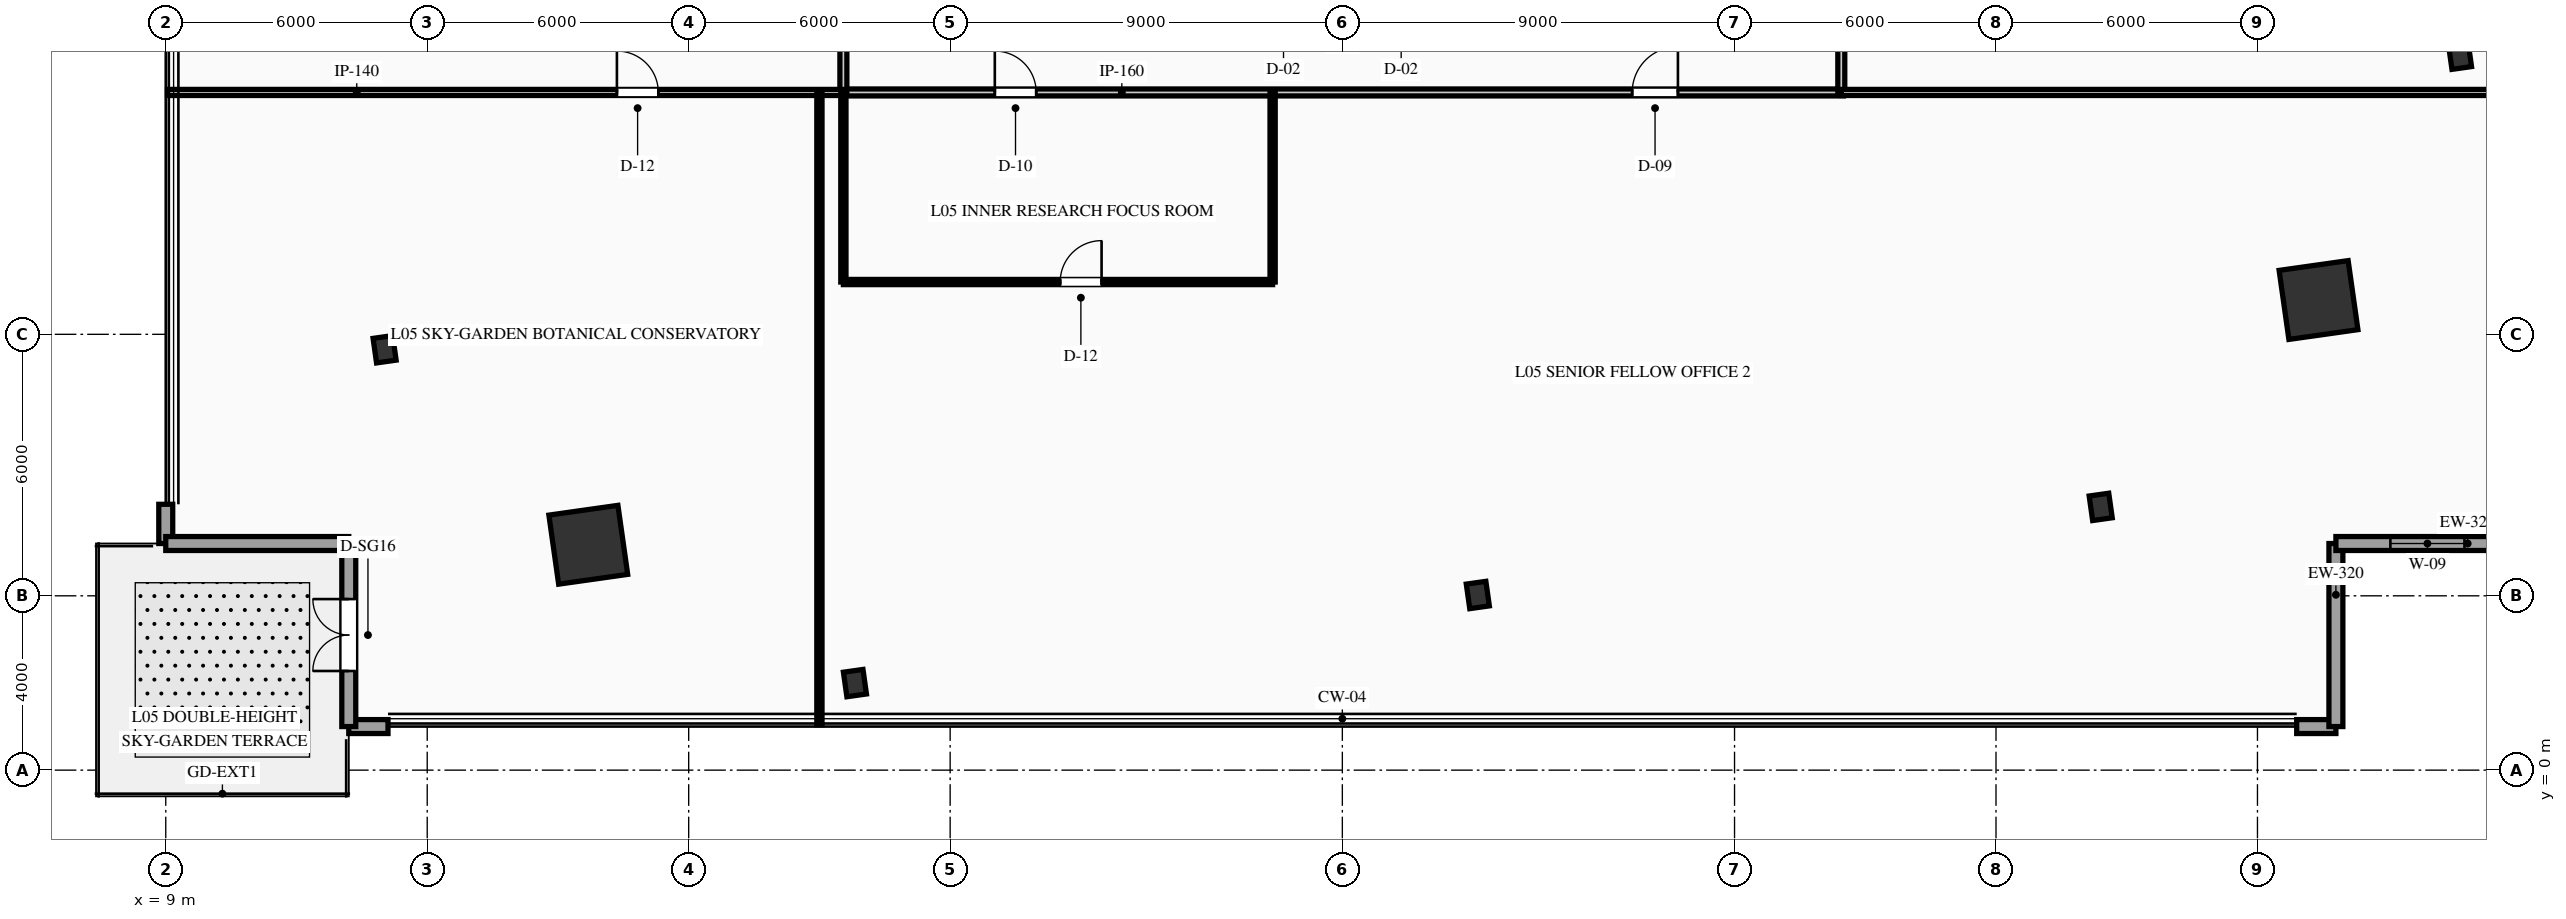
"""IFC4 building model, lengths in metres.
Left out: names, types, materials, properties, quantities, classifications, styles, units other than length and angle.
Written with IfcOpenShell. Run it as: python <this file> out.ifc"""

import sys

from ifc_helpers import new_model, si_unit, direction, frame, frame_2d, origin, origin_2d, place, context, subcontext, project, spatial, rectangle, hollow_rectangle, i_section, extrude, element, fill, save


model = new_model("IFC4")
c1 = context("Model", 3, precision=1e-05, world=origin(), true_north=direction((0.0, 1.0)))
c2 = subcontext(c1, "Body", "Model", "MODEL_VIEW")
j1 = project(units=[si_unit("LENGTHUNIT", "METRE"), si_unit("PLANEANGLEUNIT", "RADIAN")], contexts=[c1])
p1 = place(None, origin())
s1 = spatial("IfcSite", under=j1, at=p1, CompositionType="ELEMENT")
p2 = place(p1, origin())
s2 = spatial("IfcBuilding", under=s1, at=p2, CompositionType="ELEMENT")
p3 = place(p2, frame((0.0, 0.0, 28.2)))
s3 = spatial("IfcBuildingStorey", under=s2, at=p3, CompositionType="ELEMENT", Elevation=28.2)
for number, where, z_axis, x_axis in (
    (1, (18.696, 5.172, 0.0), (0.0, 0.0, 1.0), (0.99, 0.14, 0.0)),
    (2, (58.401, 10.787, 0.0), (0.0, 0.0, 1.0), (0.99, 0.14, 0.0)),
):
    element("IfcColumn", number, at=place(p3, frame(where, z_axis=z_axis, x_axis=x_axis)), inside=s3, PredefinedType="COLUMN", context=c2, shape_type="SweptSolid", body=[
        extrude(hollow_rectangle(XDim=1.6, YDim=1.6, WallThickness=0.08, at=origin_2d()), origin(), (0.0, 0.0, 1.0), 4.5),
    ])
for number, where, z_axis, x_axis in (
    (3, (24.815, 1.997, 0.0), (0.0, 0.0, 1.0), (0.99, 0.14, 0.0)),
    (4, (39.109, 4.019, 0.0), (0.0, 0.0, 1.0), (0.99, 0.14, 0.0)),
    (5, (53.403, 6.04, 0.0), (0.0, 0.0, 1.0), (0.99, 0.14, 0.0)),
    (6, (61.648, 16.393, 0.0), (0.0, 0.0, 1.0), (0.99, 0.14, 0.0)),
    (7, (14.022, 9.657, 0.0), (0.0, 0.0, 1.0), (0.99, 0.14, 0.0)),
):
    element("IfcColumn", number, at=place(p3, frame(where, z_axis=z_axis, x_axis=x_axis)), inside=s3, PredefinedType="COLUMN", context=c2, shape_type="SweptSolid", body=[
        extrude(i_section(OverallWidth=0.454, OverallDepth=0.569, WebThickness=0.078, FlangeThickness=0.125, at=origin_2d()), origin(), (0.0, 0.0, 1.0), 4.5),
    ])
for number, where, z_axis, x_axis in (
    (8, (58.8, 1.0, 0.0), (0.0, 0.0, 1.0), (-1.0, 0.0, 0.0)),
    (9, (14.1, 1.0, 0.0), (0.0, 0.0, 1.0), (-1.0, 0.0, 0.0)),
):
    element("IfcWall", number, at=place(p3, frame(where, z_axis=z_axis, x_axis=x_axis)), inside=s3, PredefinedType="STANDARD", context=c2, shape_type="SweptSolid", body=[
        extrude(rectangle(XDim=0.9, YDim=0.32, at=frame_2d((0.45, 0.0))), origin(), (0.0, 0.0, 1.0), 4.19),
    ])
p4 = place(p3, frame((58.8, 5.2, 0.0), z_axis=(0.0, 0.0, 1.0), x_axis=(0.0, -1.0, 0.0)))
e10 = element("IfcWall", 10, at=p4, inside=s3, PredefinedType="STANDARD", context=c2, shape_type="SweptSolid", body=[
    extrude(rectangle(XDim=4.2, YDim=0.32, at=frame_2d((2.1, 0.0))), origin(), (0.0, 0.0, 1.0), 4.19),
])
p5 = place(p3, frame((63.0, 5.2, 0.0), z_axis=(0.0, 0.0, 1.0), x_axis=(-1.0, 0.0, 0.0)))
e11 = element("IfcWall", 11, at=p5, inside=s3, PredefinedType="STANDARD", context=c2, shape_type="SweptSolid", body=[
    extrude(rectangle(XDim=4.2, YDim=0.32, at=frame_2d((2.1, 0.0))), origin(), (0.0, 0.0, 1.0), 4.19),
])
p6 = place(p5, frame((1.25, 0.0, 0.75)))
e12 = element("IfcOpeningElement", 12, at=p6, cuts=e11, PredefinedType="OPENING", context=c2, shape_type="SweptSolid", body=[
    extrude(rectangle(XDim=1.7, YDim=2.5, at=frame_2d((0.85, 1.25))), frame((0.0, 0.17, 0.0), z_axis=(0.0, -1.0, 0.0), x_axis=(1.0, 0.0, 0.0)), (0.0, 0.0, 1.0), 0.34),
])
p7 = place(p3, frame((9.0, 5.2, 0.0), z_axis=(0.0, 0.0, 1.0), x_axis=(0.0, 1.0, 0.0)))
e13 = element("IfcWall", 13, at=p7, inside=s3, PredefinedType="STANDARD", context=c2, shape_type="SweptSolid", body=[
    extrude(rectangle(XDim=0.9, YDim=0.32, at=frame_2d((0.45, 0.0))), origin(), (0.0, 0.0, 1.0), 4.19),
])
p8 = place(p3, frame((13.2, 5.2, 0.0), z_axis=(0.0, 0.0, 1.0), x_axis=(-1.0, 0.0, 0.0)))
e14 = element("IfcWall", 14, at=p8, inside=s3, PredefinedType="STANDARD", context=c2, shape_type="SweptSolid", body=[
    extrude(rectangle(XDim=4.2, YDim=0.32, at=frame_2d((2.1, 0.0))), origin(), (0.0, 0.0, 1.0), 4.19),
])
p9 = place(p3, frame((13.2, 1.0, 0.0), z_axis=(0.0, 0.0, 1.0), x_axis=(0.0, 1.0, 0.0)))
e15 = element("IfcWall", 15, at=p9, inside=s3, PredefinedType="STANDARD", context=c2, shape_type="SweptSolid", body=[
    extrude(rectangle(XDim=4.2, YDim=0.32, at=frame_2d((2.1, 0.0))), origin(), (0.0, 0.0, 1.0), 4.19),
])
p10 = place(p9, frame((1.275, 0.0, 0.0)))
e16 = element("IfcOpeningElement", 16, at=p10, cuts=e15, PredefinedType="OPENING", context=c2, shape_type="SweptSolid", body=[
    extrude(rectangle(XDim=1.65, YDim=2.35, at=frame_2d((0.825, 1.175))), frame((0.0, 0.17, 0.0), z_axis=(0.0, -1.0, 0.0), x_axis=(1.0, 0.0, 0.0)), (0.0, 0.0, 1.0), 0.34),
])
p11 = place(p3, frame((24.5, 15.55, 0.0), z_axis=(0.0, 0.0, 1.0), x_axis=(1.0, 0.0, 0.0)))
e17 = element("IfcWall", 17, at=p11, inside=s3, PredefinedType="PARTITIONING", context=c2, shape_type="SweptSolid", body=[
    extrude(rectangle(XDim=23.0, YDim=0.16, at=frame_2d((11.5, 0.0))), origin(), (0.0, 0.0, 1.0), 4.19),
])
p12 = place(p11, frame((3.525, 0.0, 0.0)))
e18 = element("IfcOpeningElement", 18, at=p12, cuts=e17, PredefinedType="OPENING", context=c2, shape_type="SweptSolid", body=[
    extrude(rectangle(XDim=0.95, YDim=2.15, at=frame_2d((0.475, 1.075))), frame((0.0, 0.09, 0.0), z_axis=(0.0, -1.0, 0.0), x_axis=(1.0, 0.0, 0.0)), (0.0, 0.0, 1.0), 0.18),
])
p13 = place(p11, frame((18.151, 0.0, 0.0)))
e19 = element("IfcOpeningElement", 19, at=p13, cuts=e17, PredefinedType="OPENING", context=c2, shape_type="SweptSolid", body=[
    extrude(rectangle(XDim=1.05, YDim=2.15, at=frame_2d((0.525, 1.075))), frame((0.0, 0.09, 0.0), z_axis=(0.0, -1.0, 0.0), x_axis=(1.0, 0.0, 0.0)), (0.0, 0.0, 1.0), 0.18),
])
p14 = place(p3, frame((24.55, 15.55, 0.0), z_axis=(0.0, 0.0, 1.0), x_axis=(0.0, 1.0, 0.0)))
e20 = element("IfcWall", 20, at=p14, inside=s3, PredefinedType="PARTITIONING", context=c2, shape_type="SweptSolid", body=[
    extrude(rectangle(XDim=20.9, YDim=0.16, at=frame_2d((10.45, 0.0))), origin(), (0.0, 0.0, 1.0), 4.19),
])
p15 = place(p14, frame((2.052, 0.0, 0.0)))
e21 = element("IfcOpeningElement", 21, at=p15, cuts=e20, PredefinedType="OPENING", context=c2, shape_type="SweptSolid", body=[
    extrude(rectangle(XDim=1.05, YDim=2.15, at=frame_2d((0.525, 1.075))), frame((0.0, 0.09, 0.0), z_axis=(0.0, -1.0, 0.0), x_axis=(1.0, 0.0, 0.0)), (0.0, 0.0, 1.0), 0.18),
])
p16 = place(p14, frame((15.645, 0.0, 0.0)))
e22 = element("IfcOpeningElement", 22, at=p16, cuts=e20, PredefinedType="OPENING", context=c2, shape_type="SweptSolid", body=[
    extrude(rectangle(XDim=1.05, YDim=2.15, at=frame_2d((0.525, 1.075))), frame((0.0, 0.09, 0.0), z_axis=(0.0, -1.0, 0.0), x_axis=(1.0, 0.0, 0.0)), (0.0, 0.0, 1.0), 0.18),
])
p17 = place(p3, frame((47.45, 15.55, 0.0), z_axis=(0.0, 0.0, 1.0), x_axis=(0.0, 1.0, 0.0)))
e23 = element("IfcWall", 23, at=p17, inside=s3, PredefinedType="PARTITIONING", context=c2, shape_type="SweptSolid", body=[
    extrude(rectangle(XDim=20.9, YDim=0.16, at=frame_2d((10.45, 0.0))), origin(), (0.0, 0.0, 1.0), 4.19),
])
p18 = place(p17, frame((3.747, 0.0, 0.0)))
e24 = element("IfcOpeningElement", 24, at=p18, cuts=e23, PredefinedType="OPENING", context=c2, shape_type="SweptSolid", body=[
    extrude(rectangle(XDim=1.05, YDim=2.15, at=frame_2d((0.525, 1.075))), frame((0.0, 0.09, 0.0), z_axis=(0.0, -1.0, 0.0), x_axis=(1.0, 0.0, 0.0)), (0.0, 0.0, 1.0), 0.18),
])
p19 = place(p17, frame((7.865, 0.0, 0.0)))
e25 = element("IfcOpeningElement", 25, at=p19, cuts=e23, PredefinedType="OPENING", context=c2, shape_type="SweptSolid", body=[
    extrude(rectangle(XDim=1.05, YDim=2.15, at=frame_2d((0.525, 1.075))), frame((0.0, 0.09, 0.0), z_axis=(0.0, -1.0, 0.0), x_axis=(1.0, 0.0, 0.0)), (0.0, 0.0, 1.0), 0.18),
])
p20 = place(p17, frame((18.045, 0.0, 0.0)))
e26 = element("IfcOpeningElement", 26, at=p20, cuts=e23, PredefinedType="OPENING", context=c2, shape_type="SweptSolid", body=[
    extrude(rectangle(XDim=1.05, YDim=2.15, at=frame_2d((0.525, 1.075))), frame((0.0, 0.09, 0.0), z_axis=(0.0, -1.0, 0.0), x_axis=(1.0, 0.0, 0.0)), (0.0, 0.0, 1.0), 0.18),
])
p21 = place(p3, frame((9.04, 15.55, 0.0), z_axis=(0.0, 0.0, 1.0), x_axis=(1.0, 0.0, 0.0)))
e27 = element("IfcWall", 27, at=p21, inside=s3, PredefinedType="PARTITIONING", context=c2, shape_type="SweptSolid", body=[
    extrude(rectangle(XDim=15.51, YDim=0.14, at=frame_2d((7.755, 0.0))), origin(), (0.0, 0.0, 1.0), 4.19),
])
p22 = place(p21, frame((10.313, 0.0, 0.0)))
e28 = element("IfcOpeningElement", 28, at=p22, cuts=e27, PredefinedType="OPENING", context=c2, shape_type="SweptSolid", body=[
    extrude(rectangle(XDim=0.95, YDim=2.15, at=frame_2d((0.475, 1.075))), frame((0.0, 0.08, 0.0), z_axis=(0.0, -1.0, 0.0), x_axis=(1.0, 0.0, 0.0)), (0.0, 0.0, 1.0), 0.16),
])
p23 = place(p3, frame((47.45, 15.55, 0.0), z_axis=(0.0, 0.0, 1.0), x_axis=(1.0, 0.0, 0.0)))
e29 = element("IfcWall", 29, at=p23, inside=s3, PredefinedType="PARTITIONING", context=c2, shape_type="SweptSolid", body=[
    extrude(rectangle(XDim=15.51, YDim=0.14, at=frame_2d((7.755, 0.0))), origin(), (0.0, 0.0, 1.0), 4.19),
])
p24 = place(p3, frame((24.0, 1.04, 0.0), z_axis=(0.0, 0.0, 1.0), x_axis=(0.0, 1.0, 0.0)))
e30 = element("IfcWall", 30, at=p24, inside=s3, PredefinedType="PARTITIONING", context=c2, shape_type="SweptSolid", body=[
    extrude(rectangle(XDim=14.51, YDim=0.12, at=frame_2d((7.255, 0.0))), origin(), (0.0, 0.0, 1.0), 4.19),
])
p25 = place(p3, frame((24.55, 11.2, 0.0), z_axis=(0.0, 0.0, 1.0), x_axis=(0.0, 1.0, 0.0)))
e31 = element("IfcWall", 31, at=p25, inside=s3, PredefinedType="PARTITIONING", context=c2, shape_type="SweptSolid", body=[
    extrude(rectangle(XDim=4.35, YDim=0.12, at=frame_2d((2.175, 0.0))), origin(), (0.0, 0.0, 1.0), 4.19),
])
p26 = place(p3, frame((24.55, 11.2, 0.0), z_axis=(0.0, 0.0, 1.0), x_axis=(1.0, 0.0, 0.0)))
e32 = element("IfcWall", 32, at=p26, inside=s3, PredefinedType="PARTITIONING", context=c2, shape_type="SweptSolid", body=[
    extrude(rectangle(XDim=9.85, YDim=0.12, at=frame_2d((4.925, 0.0))), origin(), (0.0, 0.0, 1.0), 4.19),
])
p27 = place(p26, frame((4.975, 0.0, 0.0)))
e33 = element("IfcOpeningElement", 33, at=p27, cuts=e32, PredefinedType="OPENING", context=c2, shape_type="SweptSolid", body=[
    extrude(rectangle(XDim=0.95, YDim=2.15, at=frame_2d((0.475, 1.075))), frame((0.0, 0.07, 0.0), z_axis=(0.0, -1.0, 0.0), x_axis=(1.0, 0.0, 0.0)), (0.0, 0.0, 1.0), 0.14),
])
p28 = place(p3, frame((34.4, 11.2, 0.0), z_axis=(0.0, 0.0, 1.0), x_axis=(0.0, 1.0, 0.0)))
e34 = element("IfcWall", 34, at=p28, inside=s3, PredefinedType="PARTITIONING", context=c2, shape_type="SweptSolid", body=[
    extrude(rectangle(XDim=4.35, YDim=0.12, at=frame_2d((2.175, 0.0))), origin(), (0.0, 0.0, 1.0), 4.19),
])
p29 = place(p6, origin())
e35 = element("IfcWindow", 35, at=p29, inside=s3, PartitioningType="SINGLE_PANEL", PredefinedType="WINDOW", context=c2, shape_type="SweptSolid", body=[
    extrude(rectangle(XDim=1.7, YDim=2.5, at=frame_2d((0.85, 1.25))), frame((0.0, 0.03, 0.0), z_axis=(0.0, -1.0, 0.0), x_axis=(1.0, 0.0, 0.0)), (0.0, 0.0, 1.0), 0.06),
])
fill(e12, e35)
p30 = place(p10, origin())
e36 = element("IfcDoor", 36, at=p30, inside=s3, OperationType="DOUBLE_DOOR_SINGLE_SWING", PredefinedType="DOOR", context=c2, shape_type="SweptSolid", body=[
    extrude(rectangle(XDim=1.65, YDim=2.35, at=frame_2d((0.825, 1.175))), frame((0.0, 0.025, 0.0), z_axis=(0.0, -1.0, 0.0), x_axis=(1.0, 0.0, 0.0)), (0.0, 0.0, 1.0), 0.05),
])
fill(e16, e36)
p31 = place(p12, origin())
e37 = element("IfcDoor", 37, at=p31, inside=s3, OperationType="SINGLE_SWING_LEFT", PredefinedType="DOOR", context=c2, shape_type="SweptSolid", body=[
    extrude(rectangle(XDim=0.95, YDim=2.15, at=frame_2d((0.475, 1.075))), frame((0.0, 0.025, 0.0), z_axis=(0.0, -1.0, 0.0), x_axis=(1.0, 0.0, 0.0)), (0.0, 0.0, 1.0), 0.05),
])
fill(e18, e37)
p32 = place(p27, origin())
e38 = element("IfcDoor", 38, at=p32, inside=s3, OperationType="SINGLE_SWING_RIGHT", PredefinedType="DOOR", context=c2, shape_type="SweptSolid", body=[
    extrude(rectangle(XDim=0.95, YDim=2.15, at=frame_2d((0.475, 1.075))), frame((0.0, 0.025, 0.0), z_axis=(0.0, -1.0, 0.0), x_axis=(1.0, 0.0, 0.0)), (0.0, 0.0, 1.0), 0.05),
])
fill(e33, e38)
p33 = place(p22, origin())
e39 = element("IfcDoor", 39, at=p33, inside=s3, OperationType="SINGLE_SWING_LEFT", PredefinedType="DOOR", context=c2, shape_type="SweptSolid", body=[
    extrude(rectangle(XDim=0.95, YDim=2.15, at=frame_2d((0.475, 1.075))), frame((0.0, 0.025, 0.0), z_axis=(0.0, -1.0, 0.0), x_axis=(1.0, 0.0, 0.0)), (0.0, 0.0, 1.0), 0.05),
])
fill(e28, e39)
p34 = place(p13, origin())
e40 = element("IfcDoor", 40, at=p34, inside=s3, OperationType="SINGLE_SWING_RIGHT", PredefinedType="DOOR", context=c2, shape_type="SweptSolid", body=[
    extrude(rectangle(XDim=1.05, YDim=2.15, at=frame_2d((0.525, 1.075))), frame((0.0, 0.025, 0.0), z_axis=(0.0, -1.0, 0.0), x_axis=(1.0, 0.0, 0.0)), (0.0, 0.0, 1.0), 0.05),
])
fill(e19, e40)
save(model, sys.argv[1])
